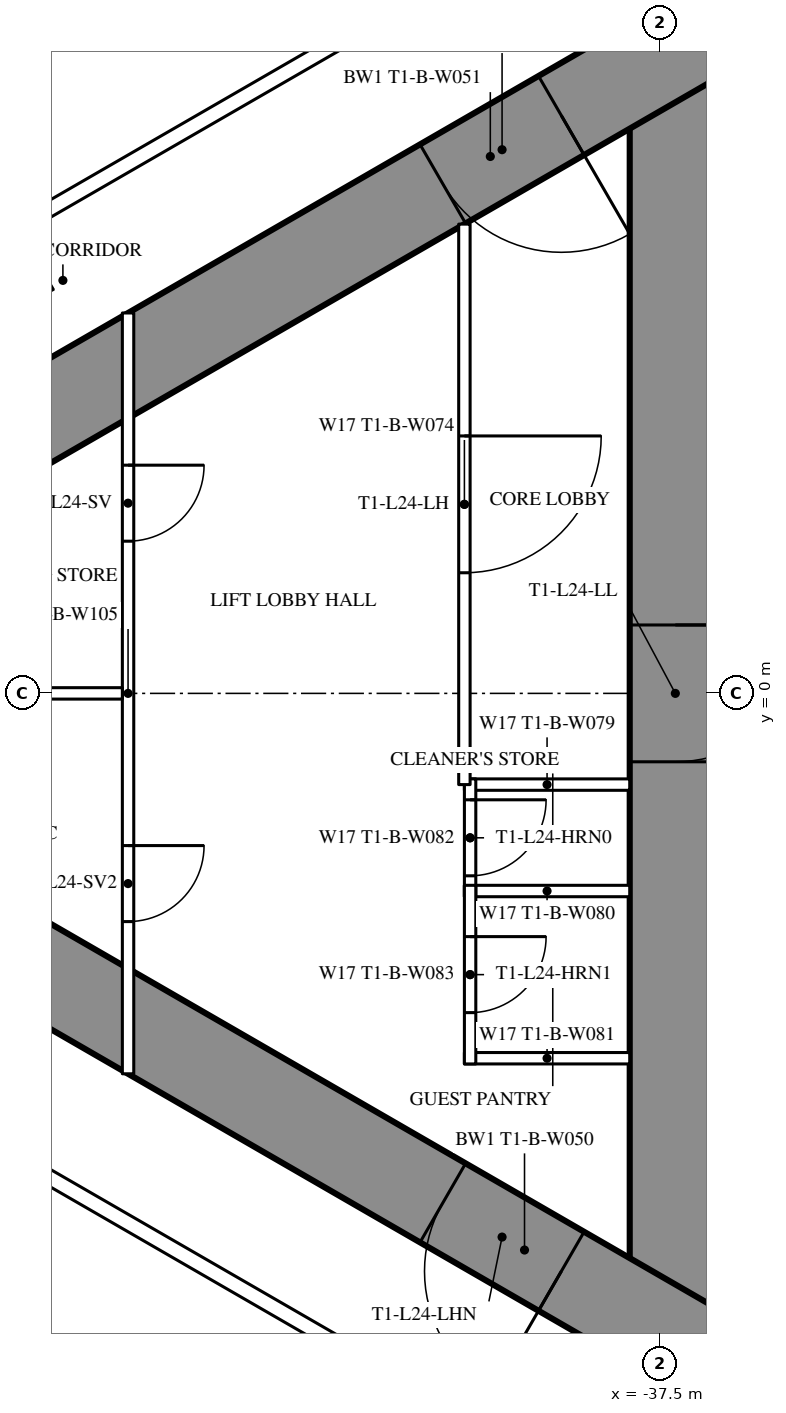
"""IFC4 building model, lengths in metres.
Left out: names, types, materials, properties, quantities, classifications, styles, units other than length and angle.
Written with IfcOpenShell. Run it as: python <this file> out.ifc"""

import sys

from ifc_helpers import new_model, si_unit, direction, frame, frame_2d, origin, place, context, subcontext, project, spatial, rectangle, extrude, element, fill, save


model = new_model("IFC4")
c1 = context("Model", 3, precision=1e-05, world=origin(), true_north=direction((0.0, 1.0)))
c2 = subcontext(c1, "Body", "Model", "MODEL_VIEW")
j1 = project(units=[si_unit("LENGTHUNIT", "METRE"), si_unit("PLANEANGLEUNIT", "RADIAN")], contexts=[c1])
p1 = place(None, origin())
s1 = spatial("IfcSite", under=j1, at=p1, CompositionType="ELEMENT")
p2 = place(p1, origin())
s2 = spatial("IfcBuilding", under=s1, at=p2, CompositionType="ELEMENT")
p3 = place(p2, frame((0.0, 0.0, 94.1)))
s3 = spatial("IfcBuildingStorey", under=s2, at=p3, CompositionType="ELEMENT", Elevation=94.1)
p4 = place(p3, frame((-37.3, 8.6, 0.0), z_axis=(0.0, 0.0, 1.0), x_axis=(0.0, -1.0, 0.0)))
e1 = element("IfcWall", 1, at=p4, inside=s3, PredefinedType="SHEAR", context=c2, shape_type="SweptSolid", body=[
    extrude(rectangle(XDim=17.2, YDim=1.2, at=frame_2d((8.6, 0.0))), origin(), (0.0, 0.0, 1.0), 3.5),
])
p5 = place(p4, frame((7.7, 0.0, 0.0)))
e2 = element("IfcOpeningElement", 2, at=p5, cuts=e1, PredefinedType="OPENING", context=c2, shape_type="SweptSolid", body=[
    extrude(rectangle(XDim=1.8, YDim=2.2, at=frame_2d((0.9, 1.1))), frame((0.0, 0.61, 0.0), z_axis=(0.0, -1.0, 0.0), x_axis=(1.0, 0.0, 0.0)), (0.0, 0.0, 1.0), 1.22),
])
p6 = place(p3, frame((-27.2, 14.3, 0.0), z_axis=(0.0, 0.0, 1.0), x_axis=(-0.866026593062, -0.499997940104, 0.0)))
e3 = element("IfcWall", 3, at=p6, inside=s3, PredefinedType="SHEAR", context=c2, shape_type="SweptSolid", body=[
    extrude(rectangle(XDim=28.946, YDim=1.2, at=frame_2d((14.473, 0.0))), origin(), (0.0, 0.0, 1.0), 3.5),
])
p7 = place(p6, frame((4.6, 0.0, 0.0)))
e4 = element("IfcOpeningElement", 4, at=p7, cuts=e3, PredefinedType="OPENING", context=c2, shape_type="SweptSolid", body=[
    extrude(rectangle(XDim=1.0, YDim=2.2, at=frame_2d((0.5, 1.1))), frame((0.0, 0.61, 0.0), z_axis=(0.0, -1.0, 0.0), x_axis=(1.0, 0.0, 0.0)), (0.0, 0.0, 1.0), 1.22),
])
p8 = place(p6, frame((13.395, 0.0, 0.0)))
e5 = element("IfcOpeningElement", 5, at=p8, cuts=e3, PredefinedType="OPENING", context=c2, shape_type="SweptSolid", body=[
    extrude(rectangle(XDim=1.8, YDim=2.2, at=frame_2d((0.9, 1.1))), frame((0.0, 0.61, 0.0), z_axis=(0.0, -1.0, 0.0), x_axis=(1.0, 0.0, 0.0)), (0.0, 0.0, 1.0), 1.22),
])
p9 = place(p3, frame((-27.2, -14.3, 0.0), z_axis=(0.0, 0.0, 1.0), x_axis=(-0.866024021859, 0.500002393557, 0.0)))
e6 = element("IfcWall", 6, at=p9, inside=s3, PredefinedType="SHEAR", context=c2, shape_type="SweptSolid", body=[
    extrude(rectangle(XDim=27.907, YDim=1.2, at=frame_2d((13.954, 0.0))), origin(), (0.0, 0.0, 1.0), 3.5),
])
p10 = place(p9, frame((4.6, 0.0, 0.0)))
e7 = element("IfcOpeningElement", 7, at=p10, cuts=e6, PredefinedType="OPENING", context=c2, shape_type="SweptSolid", body=[
    extrude(rectangle(XDim=1.0, YDim=2.2, at=frame_2d((0.5, 1.1))), frame((0.0, 0.61, 0.0), z_axis=(0.0, -1.0, 0.0), x_axis=(1.0, 0.0, 0.0)), (0.0, 0.0, 1.0), 1.22),
])
p11 = place(p9, frame((13.395, 0.0, 0.0)))
e8 = element("IfcOpeningElement", 8, at=p11, cuts=e6, PredefinedType="OPENING", context=c2, shape_type="SweptSolid", body=[
    extrude(rectangle(XDim=1.8, YDim=2.2, at=frame_2d((0.9, 1.1))), frame((0.0, 0.61, 0.0), z_axis=(0.0, -1.0, 0.0), x_axis=(1.0, 0.0, 0.0)), (0.0, 0.0, 1.0), 1.22),
])
p12 = place(p3, frame((-37.7, 10.894, 0.0), z_axis=(0.0, 0.0, 1.0), x_axis=(-0.866027905338, -0.499995667157, 0.0)))
e9 = element("IfcWall", 9, at=p12, inside=s3, PredefinedType="PARTITIONING", context=c2, shape_type="SweptSolid", body=[
    extrude(rectangle(XDim=21.787, YDim=0.2, at=frame_2d((10.894, 0.0))), origin(), (0.0, 0.0, 1.0), 3.25),
])
p13 = place(p12, frame((17.887, 0.0, 0.0)))
e10 = element("IfcOpeningElement", 10, at=p13, cuts=e9, PredefinedType="OPENING", context=c2, shape_type="SweptSolid", body=[
    extrude(rectangle(XDim=0.95, YDim=2.2, at=frame_2d((0.475, 1.1))), frame((0.0, 0.11, 0.0), z_axis=(0.0, -1.0, 0.0), x_axis=(1.0, 0.0, 0.0)), (0.0, 0.0, 1.0), 0.22),
])
p14 = place(p12, frame((9.531, 0.0, 0.0)))
e11 = element("IfcOpeningElement", 11, at=p14, cuts=e9, PredefinedType="OPENING", context=c2, shape_type="SweptSolid", body=[
    extrude(rectangle(XDim=0.95, YDim=2.2, at=frame_2d((0.475, 1.1))), frame((0.0, 0.11, 0.0), z_axis=(0.0, -1.0, 0.0), x_axis=(1.0, 0.0, 0.0)), (0.0, 0.0, 1.0), 0.22),
])
p15 = place(p3, frame((-36.92, -11.344, 0.0), z_axis=(0.0, 0.0, 1.0), x_axis=(-0.866028313256, 0.499994960614, 0.0)))
e12 = element("IfcWall", 12, at=p15, inside=s3, PredefinedType="PARTITIONING", context=c2, shape_type="SweptSolid", body=[
    extrude(rectangle(XDim=22.568, YDim=0.2, at=frame_2d((11.284, 0.0))), origin(), (0.0, 0.0, 1.0), 3.25),
])
p16 = place(p15, frame((14.481, 0.0, 0.0)))
e13 = element("IfcOpeningElement", 13, at=p16, cuts=e12, PredefinedType="OPENING", context=c2, shape_type="SweptSolid", body=[
    extrude(rectangle(XDim=0.95, YDim=2.2, at=frame_2d((0.475, 1.1))), frame((0.0, 0.11, 0.0), z_axis=(0.0, -1.0, 0.0), x_axis=(1.0, 0.0, 0.0)), (0.0, 0.0, 1.0), 0.22),
])
p17 = place(p15, frame((3.35, 0.0, 0.0)))
e14 = element("IfcOpeningElement", 14, at=p17, cuts=e12, PredefinedType="OPENING", context=c2, shape_type="SweptSolid", body=[
    extrude(rectangle(XDim=1.0, YDim=2.2, at=frame_2d((0.5, 1.1))), frame((0.0, 0.11, 0.0), z_axis=(0.0, -1.0, 0.0), x_axis=(1.0, 0.0, 0.0)), (0.0, 0.0, 1.0), 0.22),
])
for number, where, z_axis, x_axis in (
    (15, (-37.9, -1.2, 0.0), (0.0, 0.0, 1.0), (-1.0, 0.0, 0.0)),
    (16, (-37.9, -2.6, 0.0), (0.0, 0.0, 1.0), (-1.0, 0.0, 0.0)),
    (17, (-37.9, -4.8, 0.0), (0.0, 0.0, 1.0), (-1.0, 0.0, 0.0)),
):
    element("IfcWall", number, at=place(p3, frame(where, z_axis=z_axis, x_axis=x_axis)), inside=s3, PredefinedType="PARTITIONING", context=c2, shape_type="SweptSolid", body=[
        extrude(rectangle(XDim=2.175, YDim=0.15, at=frame_2d((1.087, 0.0))), origin(), (0.0, 0.0, 1.0), 3.25),
    ])
p18 = place(p3, frame((-40.0, -1.125, 0.0), z_axis=(0.0, 0.0, 1.0), x_axis=(0.0, -1.0, 0.0)))
e18 = element("IfcWall", 18, at=p18, inside=s3, PredefinedType="PARTITIONING", context=c2, shape_type="SweptSolid", body=[
    extrude(rectangle(XDim=1.55, YDim=0.15, at=frame_2d((0.775, 0.0))), origin(), (0.0, 0.0, 1.0), 3.25),
])
p19 = place(p18, frame((0.275, 0.0, 0.0)))
e19 = element("IfcOpeningElement", 19, at=p19, cuts=e18, PredefinedType="OPENING", context=c2, shape_type="SweptSolid", body=[
    extrude(rectangle(XDim=1.0, YDim=2.2, at=frame_2d((0.5, 1.1))), frame((0.0, 0.085, 0.0), z_axis=(0.0, -1.0, 0.0), x_axis=(1.0, 0.0, 0.0)), (0.0, 0.0, 1.0), 0.17),
])
p20 = place(p3, frame((-40.0, -2.525, 0.0), z_axis=(0.0, 0.0, 1.0), x_axis=(0.0, -1.0, 0.0)))
e20 = element("IfcWall", 20, at=p20, inside=s3, PredefinedType="PARTITIONING", context=c2, shape_type="SweptSolid", body=[
    extrude(rectangle(XDim=2.35, YDim=0.15, at=frame_2d((1.175, 0.0))), origin(), (0.0, 0.0, 1.0), 3.25),
])
p21 = place(p20, frame((0.675, 0.0, 0.0)))
e21 = element("IfcOpeningElement", 21, at=p21, cuts=e20, PredefinedType="OPENING", context=c2, shape_type="SweptSolid", body=[
    extrude(rectangle(XDim=1.0, YDim=2.2, at=frame_2d((0.5, 1.1))), frame((0.0, 0.085, 0.0), z_axis=(0.0, -1.0, 0.0), x_axis=(1.0, 0.0, 0.0)), (0.0, 0.0, 1.0), 0.17),
])
p22 = place(p3, frame((-40.075, 6.174, 0.0), z_axis=(0.0, 0.0, 1.0), x_axis=(0.0, -1.0, 0.0)))
e22 = element("IfcWall", 22, at=p22, inside=s3, PredefinedType="PARTITIONING", context=c2, shape_type="SweptSolid", body=[
    extrude(rectangle(XDim=7.374, YDim=0.15, at=frame_2d((3.687, 0.0))), origin(), (0.0, 0.0, 1.0), 3.25),
])
p23 = place(p22, frame((2.787, 0.0, 0.0)))
e23 = element("IfcOpeningElement", 23, at=p23, cuts=e22, PredefinedType="OPENING", context=c2, shape_type="SweptSolid", body=[
    extrude(rectangle(XDim=1.8, YDim=2.2, at=frame_2d((0.9, 1.1))), frame((0.0, 0.085, 0.0), z_axis=(0.0, -1.0, 0.0), x_axis=(1.0, 0.0, 0.0)), (0.0, 0.0, 1.0), 0.17),
])
p24 = place(p3, frame((-44.5, 5.005, 0.0), z_axis=(0.0, 0.0, 1.0), x_axis=(0.0, -1.0, 0.0)))
e24 = element("IfcWall", 24, at=p24, inside=s3, PredefinedType="PARTITIONING", context=c2, shape_type="SweptSolid", body=[
    extrude(rectangle(XDim=10.009, YDim=0.15, at=frame_2d((5.005, 0.0))), origin(), (0.0, 0.0, 1.0), 2.45),
])
p25 = place(p24, frame((2.002, 0.0, 0.0)))
e25 = element("IfcOpeningElement", 25, at=p25, cuts=e24, PredefinedType="OPENING", context=c2, shape_type="SweptSolid", body=[
    extrude(rectangle(XDim=1.0, YDim=2.2, at=frame_2d((0.5, 1.1))), frame((0.0, 0.085, 0.0), z_axis=(0.0, -1.0, 0.0), x_axis=(1.0, 0.0, 0.0)), (0.0, 0.0, 1.0), 0.17),
])
p26 = place(p24, frame((7.007, 0.0, 0.0)))
e26 = element("IfcOpeningElement", 26, at=p26, cuts=e24, PredefinedType="OPENING", context=c2, shape_type="SweptSolid", body=[
    extrude(rectangle(XDim=1.0, YDim=2.2, at=frame_2d((0.5, 1.1))), frame((0.0, 0.085, 0.0), z_axis=(0.0, -1.0, 0.0), x_axis=(1.0, 0.0, 0.0)), (0.0, 0.0, 1.0), 0.17),
])
p27 = place(p3, frame((-44.575, 0.0, 0.0), z_axis=(0.0, 0.0, 1.0), x_axis=(-1.0, 0.0, 0.0)))
e27 = element("IfcWall", 27, at=p27, inside=s3, PredefinedType="PARTITIONING", context=c2, shape_type="SweptSolid", body=[
    extrude(rectangle(XDim=8.593, YDim=0.15, at=frame_2d((4.297, 0.0))), origin(), (0.0, 0.0, 1.0), 2.2),
])
p28 = place(p19, origin())
e28 = element("IfcDoor", 28, at=p28, inside=s3, OperationType="SINGLE_SWING_LEFT", PredefinedType="DOOR", context=c2, shape_type="SweptSolid", body=[
    extrude(rectangle(XDim=1.0, YDim=2.2, at=frame_2d((0.5, 1.1))), frame((0.0, 0.025, 0.0), z_axis=(0.0, -1.0, 0.0), x_axis=(1.0, 0.0, 0.0)), (0.0, 0.0, 1.0), 0.05),
])
fill(e19, e28)
p29 = place(p21, origin())
e29 = element("IfcDoor", 29, at=p29, inside=s3, OperationType="SINGLE_SWING_LEFT", PredefinedType="DOOR", context=c2, shape_type="SweptSolid", body=[
    extrude(rectangle(XDim=1.0, YDim=2.2, at=frame_2d((0.5, 1.1))), frame((0.0, 0.025, 0.0), z_axis=(0.0, -1.0, 0.0), x_axis=(1.0, 0.0, 0.0)), (0.0, 0.0, 1.0), 0.05),
])
fill(e21, e29)
p30 = place(p23, origin())
e30 = element("IfcDoor", 30, at=p30, inside=s3, OperationType="DOUBLE_DOOR_SINGLE_SWING", PredefinedType="DOOR", context=c2, shape_type="SweptSolid", body=[
    extrude(rectangle(XDim=1.8, YDim=2.2, at=frame_2d((0.9, 1.1))), frame((0.0, 0.025, 0.0), z_axis=(0.0, -1.0, 0.0), x_axis=(1.0, 0.0, 0.0)), (0.0, 0.0, 1.0), 0.05),
])
fill(e23, e30)
p31 = place(p25, origin())
e31 = element("IfcDoor", 31, at=p31, inside=s3, OperationType="SINGLE_SWING_LEFT", PredefinedType="DOOR", context=c2, shape_type="SweptSolid", body=[
    extrude(rectangle(XDim=1.0, YDim=2.2, at=frame_2d((0.5, 1.1))), frame((0.0, 0.025, 0.0), z_axis=(0.0, -1.0, 0.0), x_axis=(1.0, 0.0, 0.0)), (0.0, 0.0, 1.0), 0.05),
])
fill(e25, e31)
p32 = place(p26, origin())
e32 = element("IfcDoor", 32, at=p32, inside=s3, OperationType="SINGLE_SWING_LEFT", PredefinedType="DOOR", context=c2, shape_type="SweptSolid", body=[
    extrude(rectangle(XDim=1.0, YDim=2.2, at=frame_2d((0.5, 1.1))), frame((0.0, 0.025, 0.0), z_axis=(0.0, -1.0, 0.0), x_axis=(1.0, 0.0, 0.0)), (0.0, 0.0, 1.0), 0.05),
])
fill(e26, e32)
p33 = place(p8, origin())
e33 = element("IfcDoor", 33, at=p33, inside=s3, OperationType="DOUBLE_DOOR_SINGLE_SWING", PredefinedType="DOOR", context=c2, shape_type="SweptSolid", body=[
    extrude(rectangle(XDim=1.8, YDim=2.2, at=frame_2d((0.9, 1.1))), frame((0.0, 0.025, 0.0), z_axis=(0.0, -1.0, 0.0), x_axis=(1.0, 0.0, 0.0)), (0.0, 0.0, 1.0), 0.05),
])
fill(e5, e33)
p34 = place(p11, origin())
e34 = element("IfcDoor", 34, at=p34, inside=s3, OperationType="DOUBLE_DOOR_SINGLE_SWING", PredefinedType="DOOR", context=c2, shape_type="SweptSolid", body=[
    extrude(rectangle(XDim=1.8, YDim=2.2, at=frame_2d((0.9, 1.1))), frame((0.0, 0.025, 0.0), z_axis=(0.0, -1.0, 0.0), x_axis=(1.0, 0.0, 0.0)), (0.0, 0.0, 1.0), 0.05),
])
fill(e8, e34)
p35 = place(p5, origin())
e35 = element("IfcDoor", 35, at=p35, inside=s3, OperationType="DOUBLE_DOOR_SINGLE_SWING", PredefinedType="DOOR", context=c2, shape_type="SweptSolid", body=[
    extrude(rectangle(XDim=1.8, YDim=2.2, at=frame_2d((0.9, 1.1))), frame((0.0, 0.025, 0.0), z_axis=(0.0, -1.0, 0.0), x_axis=(1.0, 0.0, 0.0)), (0.0, 0.0, 1.0), 0.05),
])
fill(e2, e35)
save(model, sys.argv[1])
